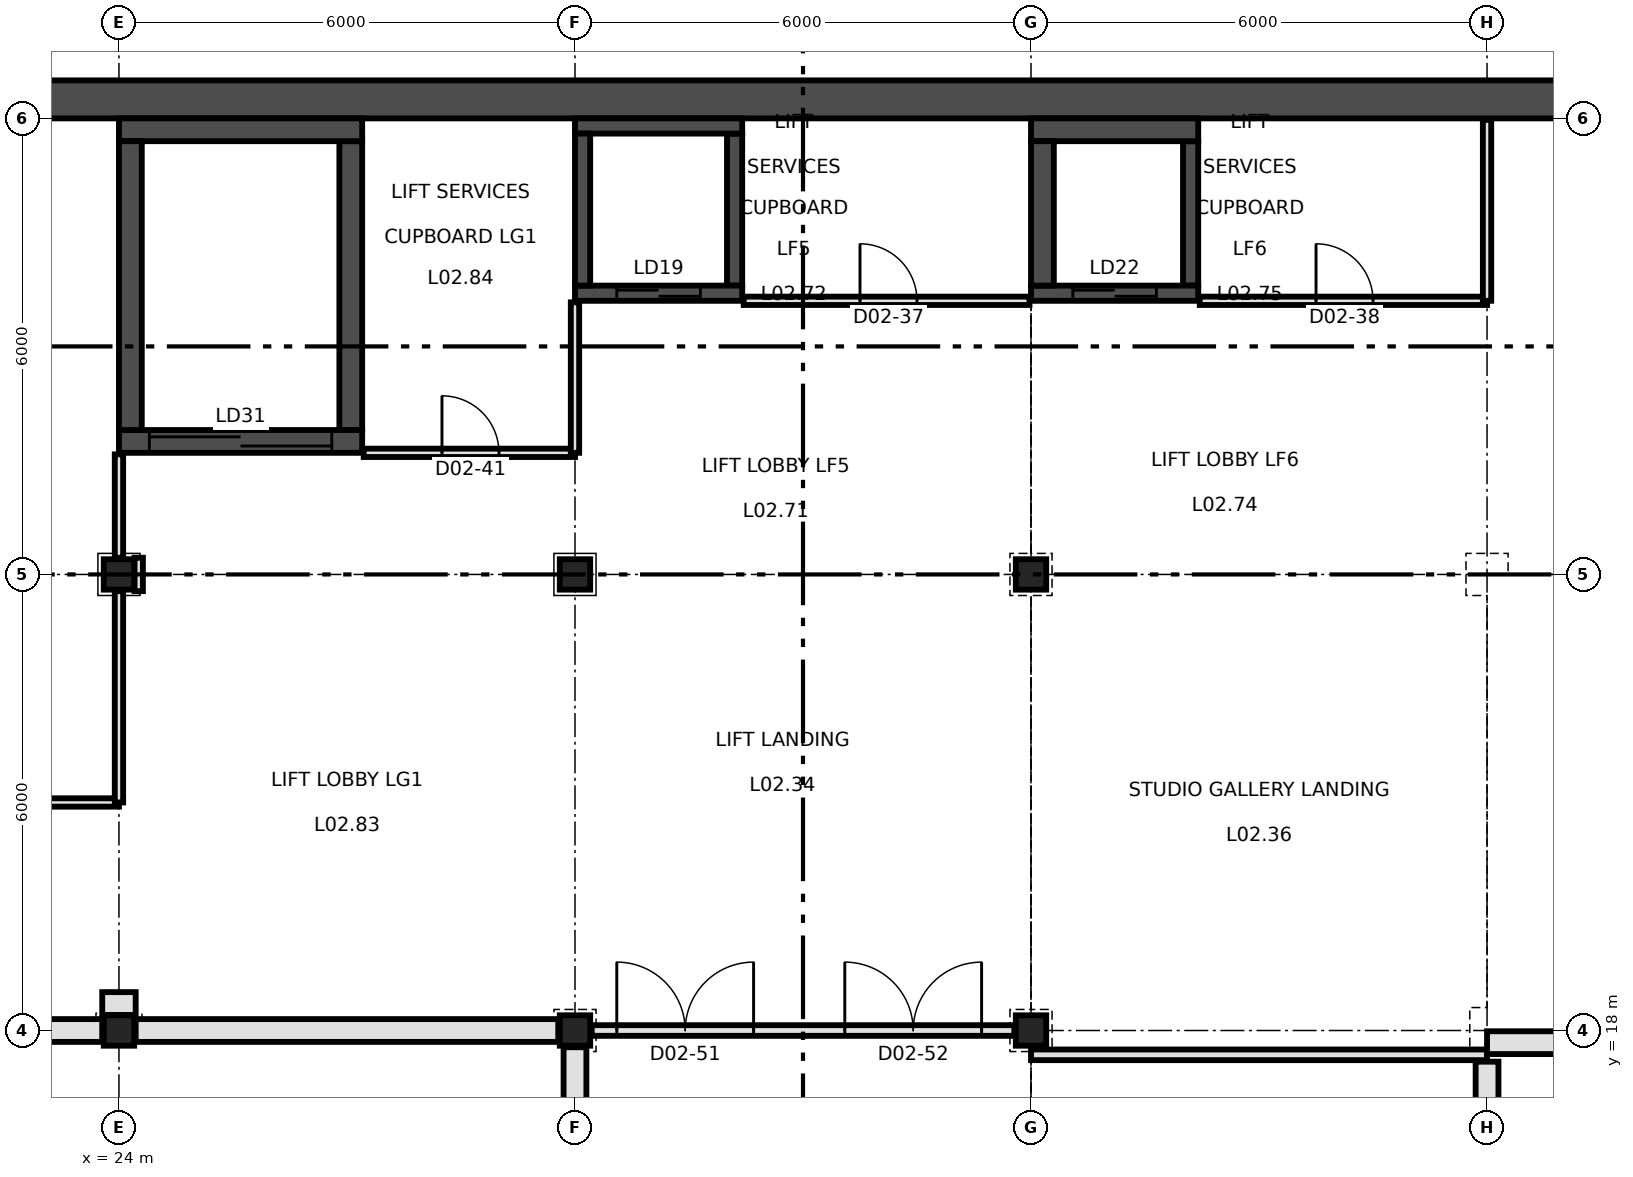
"""IFC4 building model, lengths in metres.
Left out: names, types, materials, properties, quantities, classifications, styles, units other than length and angle.
Written with IfcOpenShell. Run it as: python <this file> out.ifc"""

import sys

from ifc_helpers import new_model, si_unit, direction, frame, frame_2d, origin, origin_2d, place, context, subcontext, project, spatial, rectangle, extrude, element, fill, save


model = new_model("IFC4")
c1 = context("Model", 3, precision=1e-05, world=origin(), true_north=direction((0.0, 1.0)))
c2 = subcontext(c1, "Body", "Model", "MODEL_VIEW")
j1 = project(units=[si_unit("LENGTHUNIT", "METRE"), si_unit("PLANEANGLEUNIT", "RADIAN")], contexts=[c1])
p1 = place(None, origin())
s1 = spatial("IfcSite", under=j1, at=p1, CompositionType="ELEMENT")
p2 = place(p1, origin())
s2 = spatial("IfcBuilding", under=s1, at=p2, CompositionType="ELEMENT")
p3 = place(p2, frame((0.0, 0.0, 12.0)))
s3 = spatial("IfcBuildingStorey", under=s2, at=p3, CompositionType="ELEMENT", Elevation=12.0)
for number, where, z_axis, x_axis in (
    (1, (24.0, 18.0, 0.0), (0.0, 0.0, 1.0), (1.0, 0.0, 0.0)),
    (2, (30.0, 18.0, 0.0), (0.0, 0.0, 1.0), (1.0, 0.0, 0.0)),
    (3, (36.0, 18.0, 0.0), (0.0, 0.0, 1.0), (1.0, 0.0, 0.0)),
    (4, (24.0, 24.0, 0.0), (0.0, 0.0, 1.0), (1.0, 0.0, 0.0)),
    (5, (30.0, 24.0, 0.0), (0.0, 0.0, 1.0), (1.0, 0.0, 0.0)),
    (6, (36.0, 24.0, 0.0), (0.0, 0.0, 1.0), (1.0, 0.0, 0.0)),
):
    element("IfcColumn", number, at=place(p3, frame(where, z_axis=z_axis, x_axis=x_axis)), inside=s3, PredefinedType="COLUMN", context=c2, shape_type="SweptSolid", body=[
        extrude(rectangle(XDim=0.4, YDim=0.4, at=origin_2d()), origin(), (0.0, 0.0, 1.0), 4.5),
    ])
p4 = place(p3, frame((30.0, 29.9, 0.0), z_axis=(0.0, 0.0, 1.0), x_axis=(1.0, 0.0, 0.0)))
e7 = element("IfcWall", 7, at=p4, inside=s3, PredefinedType="SHEAR", context=c2, shape_type="SweptSolid", body=[
    extrude(rectangle(XDim=2.2, YDim=0.2, at=frame_2d((1.1, 0.0))), origin(), (0.0, 0.0, 1.0), 4.5),
])
p5 = place(p3, frame((30.0, 27.7, 0.0), z_axis=(0.0, 0.0, 1.0), x_axis=(1.0, 0.0, 0.0)))
e8 = element("IfcWall", 8, at=p5, inside=s3, PredefinedType="SHEAR", context=c2, shape_type="SweptSolid", body=[
    extrude(rectangle(XDim=2.2, YDim=0.2, at=frame_2d((1.1, 0.0))), origin(), (0.0, 0.0, 1.0), 4.5),
])
p6 = place(p5, frame((0.55, 0.0, 0.0)))
e9 = element("IfcOpeningElement", 9, at=p6, cuts=e8, PredefinedType="OPENING", context=c2, shape_type="SweptSolid", body=[
    extrude(rectangle(XDim=1.1, YDim=2.1, at=frame_2d((0.55, 1.05))), frame((0.0, 0.11, 0.0), z_axis=(0.0, -1.0, 0.0), x_axis=(1.0, 0.0, 0.0)), (0.0, 0.0, 1.0), 0.22),
])
for number, where, z_axis, x_axis in (
    (10, (30.1, 27.8, 0.0), (0.0, 0.0, 1.0), (0.0, 1.0, 0.0)),
    (11, (32.1, 27.8, 0.0), (0.0, 0.0, 1.0), (0.0, 1.0, 0.0)),
):
    element("IfcWall", number, at=place(p3, frame(where, z_axis=z_axis, x_axis=x_axis)), inside=s3, PredefinedType="SHEAR", context=c2, shape_type="SweptSolid", body=[
        extrude(rectangle(XDim=2.0, YDim=0.2, at=frame_2d((1.0, 0.0))), origin(), (0.0, 0.0, 1.0), 4.5),
    ])
p7 = place(p3, frame((36.0, 29.85, 0.0), z_axis=(0.0, 0.0, 1.0), x_axis=(1.0, 0.0, 0.0)))
e12 = element("IfcWall", 12, at=p7, inside=s3, PredefinedType="SHEAR", context=c2, shape_type="SweptSolid", body=[
    extrude(rectangle(XDim=2.2, YDim=0.3, at=frame_2d((1.1, 0.0))), origin(), (0.0, 0.0, 1.0), 4.5),
])
p8 = place(p3, frame((36.0, 27.7, 0.0), z_axis=(0.0, 0.0, 1.0), x_axis=(1.0, 0.0, 0.0)))
e13 = element("IfcWall", 13, at=p8, inside=s3, PredefinedType="SHEAR", context=c2, shape_type="SweptSolid", body=[
    extrude(rectangle(XDim=2.2, YDim=0.2, at=frame_2d((1.1, 0.0))), origin(), (0.0, 0.0, 1.0), 4.5),
])
p9 = place(p8, frame((0.55, 0.0, 0.0)))
e14 = element("IfcOpeningElement", 14, at=p9, cuts=e13, PredefinedType="OPENING", context=c2, shape_type="SweptSolid", body=[
    extrude(rectangle(XDim=1.1, YDim=2.1, at=frame_2d((0.55, 1.05))), frame((0.0, 0.11, 0.0), z_axis=(0.0, -1.0, 0.0), x_axis=(1.0, 0.0, 0.0)), (0.0, 0.0, 1.0), 0.22),
])
p10 = place(p3, frame((36.15, 27.8, 0.0), z_axis=(0.0, 0.0, 1.0), x_axis=(0.0, 1.0, 0.0)))
e15 = element("IfcWall", 15, at=p10, inside=s3, PredefinedType="SHEAR", context=c2, shape_type="SweptSolid", body=[
    extrude(rectangle(XDim=1.9, YDim=0.3, at=frame_2d((0.95, 0.0))), origin(), (0.0, 0.0, 1.0), 4.5),
])
p11 = place(p3, frame((38.1, 27.8, 0.0), z_axis=(0.0, 0.0, 1.0), x_axis=(0.0, 1.0, 0.0)))
e16 = element("IfcWall", 16, at=p11, inside=s3, PredefinedType="SHEAR", context=c2, shape_type="SweptSolid", body=[
    extrude(rectangle(XDim=1.9, YDim=0.2, at=frame_2d((0.95, 0.0))), origin(), (0.0, 0.0, 1.0), 4.5),
])
p12 = place(p3, frame((24.0, 29.85, 0.0), z_axis=(0.0, 0.0, 1.0), x_axis=(1.0, 0.0, 0.0)))
e17 = element("IfcWall", 17, at=p12, inside=s3, PredefinedType="SHEAR", context=c2, shape_type="SweptSolid", body=[
    extrude(rectangle(XDim=3.2, YDim=0.3, at=frame_2d((1.6, 0.0))), origin(), (0.0, 0.0, 1.0), 4.5),
])
p13 = place(p3, frame((24.0, 25.75, 0.0), z_axis=(0.0, 0.0, 1.0), x_axis=(1.0, 0.0, 0.0)))
e18 = element("IfcWall", 18, at=p13, inside=s3, PredefinedType="SHEAR", context=c2, shape_type="SweptSolid", body=[
    extrude(rectangle(XDim=3.2, YDim=0.3, at=frame_2d((1.6, 0.0))), origin(), (0.0, 0.0, 1.0), 4.5),
])
p14 = place(p13, frame((0.4, 0.0, 0.0)))
e19 = element("IfcOpeningElement", 19, at=p14, cuts=e18, PredefinedType="OPENING", context=c2, shape_type="SweptSolid", body=[
    extrude(rectangle(XDim=2.4, YDim=2.4, at=frame_2d((1.2, 1.2))), frame((0.0, 0.16, 0.0), z_axis=(0.0, -1.0, 0.0), x_axis=(1.0, 0.0, 0.0)), (0.0, 0.0, 1.0), 0.32),
])
for number, where, z_axis, x_axis in (
    (20, (24.15, 25.9, 0.0), (0.0, 0.0, 1.0), (0.0, 1.0, 0.0)),
    (21, (27.05, 25.9, 0.0), (0.0, 0.0, 1.0), (0.0, 1.0, 0.0)),
):
    element("IfcWall", number, at=place(p3, frame(where, z_axis=z_axis, x_axis=x_axis)), inside=s3, PredefinedType="SHEAR", context=c2, shape_type="SweptSolid", body=[
        extrude(rectangle(XDim=3.8, YDim=0.3, at=frame_2d((1.9, 0.0))), origin(), (0.0, 0.0, 1.0), 4.5),
    ])
p15 = place(p3, frame((18.5, 30.25, 0.0), z_axis=(0.0, 0.0, 1.0), x_axis=(1.0, 0.0, 0.0)))
e22 = element("IfcWall", 22, at=p15, inside=s3, PredefinedType="SHEAR", context=c2, shape_type="SweptSolid", body=[
    extrude(rectangle(XDim=29.0, YDim=0.5, at=frame_2d((14.5, 0.0))), origin(), (0.0, 0.0, 1.0), 4.5),
])
p16 = place(p3, frame((18.0, 21.0, 0.0), z_axis=(0.0, 0.0, 1.0), x_axis=(1.0, 0.0, 0.0)))
e23 = element("IfcWall", 23, at=p16, inside=s3, PredefinedType="PARTITIONING", context=c2, shape_type="SweptSolid", body=[
    extrude(rectangle(XDim=6.0, YDim=0.11, at=frame_2d((3.0, 0.0))), origin(), (0.0, 0.0, 1.0), 4.28),
])
p17 = place(p16, frame((2.25, 0.0, 0.0)))
e24 = element("IfcOpeningElement", 24, at=p17, cuts=e23, PredefinedType="OPENING", context=c2, shape_type="SweptSolid", body=[
    extrude(rectangle(XDim=1.5, YDim=2.1, at=frame_2d((0.75, 1.05))), frame((0.0, 0.065, 0.0), z_axis=(0.0, -1.0, 0.0), x_axis=(1.0, 0.0, 0.0)), (0.0, 0.0, 1.0), 0.13),
])
p18 = place(p3, frame((24.0, 21.0, 0.0), z_axis=(0.0, 0.0, 1.0), x_axis=(0.0, 1.0, 0.0)))
e25 = element("IfcWall", 25, at=p18, inside=s3, PredefinedType="PARTITIONING", context=c2, shape_type="SweptSolid", body=[
    extrude(rectangle(XDim=2.78, YDim=0.11, at=frame_2d((1.39, 0.0))), origin(), (0.0, 0.0, 1.0), 4.28),
])
p19 = place(p3, frame((24.0, 24.22, 0.0), z_axis=(0.0, 0.0, 1.0), x_axis=(0.0, 1.0, 0.0)))
e26 = element("IfcWall", 26, at=p19, inside=s3, PredefinedType="PARTITIONING", context=c2, shape_type="SweptSolid", body=[
    extrude(rectangle(XDim=1.36, YDim=0.11, at=frame_2d((0.68, 0.0))), origin(), (0.0, 0.0, 1.0), 4.28),
])
p20 = place(p3, frame((24.26, 23.78, 0.0), z_axis=(0.0, 0.0, 1.0), x_axis=(0.0, 1.0, 0.0)))
e27 = element("IfcWall", 27, at=p20, inside=s3, PredefinedType="PARTITIONING", context=c2, shape_type="SweptSolid", body=[
    extrude(rectangle(XDim=0.44, YDim=0.11, at=frame_2d((0.22, 0.0))), origin(), (0.0, 0.0, 1.0), 4.28),
])
p21 = place(p3, frame((27.22, 25.6, 0.0), z_axis=(0.0, 0.0, 1.0), x_axis=(1.0, 0.0, 0.0)))
e28 = element("IfcWall", 28, at=p21, inside=s3, PredefinedType="PARTITIONING", context=c2, shape_type="SweptSolid", body=[
    extrude(rectangle(XDim=2.78, YDim=0.11, at=frame_2d((1.39, 0.0))), origin(), (0.0, 0.0, 1.0), 4.28),
])
p22 = place(p21, frame((1.03, 0.0, 0.0)))
e29 = element("IfcOpeningElement", 29, at=p22, cuts=e28, PredefinedType="OPENING", context=c2, shape_type="SweptSolid", body=[
    extrude(rectangle(XDim=0.75, YDim=2.04, at=frame_2d((0.375, 1.02))), frame((0.0, 0.065, 0.0), z_axis=(0.0, -1.0, 0.0), x_axis=(1.0, 0.0, 0.0)), (0.0, 0.0, 1.0), 0.13),
])
p23 = place(p3, frame((30.0, 25.6, 0.0), z_axis=(0.0, 0.0, 1.0), x_axis=(0.0, 1.0, 0.0)))
e30 = element("IfcWall", 30, at=p23, inside=s3, PredefinedType="PARTITIONING", context=c2, shape_type="SweptSolid", body=[
    extrude(rectangle(XDim=1.98, YDim=0.11, at=frame_2d((0.99, 0.0))), origin(), (0.0, 0.0, 1.0), 4.28),
])
p24 = place(p3, frame((32.22, 27.6, 0.0), z_axis=(0.0, 0.0, 1.0), x_axis=(1.0, 0.0, 0.0)))
e31 = element("IfcWall", 31, at=p24, inside=s3, PredefinedType="PARTITIONING", context=c2, shape_type="SweptSolid", body=[
    extrude(rectangle(XDim=3.76, YDim=0.11, at=frame_2d((1.88, 0.0))), origin(), (0.0, 0.0, 1.0), 4.28),
])
p25 = place(p24, frame((1.53, 0.0, 0.0)))
e32 = element("IfcOpeningElement", 32, at=p25, cuts=e31, PredefinedType="OPENING", context=c2, shape_type="SweptSolid", body=[
    extrude(rectangle(XDim=0.75, YDim=2.04, at=frame_2d((0.375, 1.02))), frame((0.0, 0.065, 0.0), z_axis=(0.0, -1.0, 0.0), x_axis=(1.0, 0.0, 0.0)), (0.0, 0.0, 1.0), 0.13),
])
p26 = place(p3, frame((38.22, 27.6, 0.0), z_axis=(0.0, 0.0, 1.0), x_axis=(1.0, 0.0, 0.0)))
e33 = element("IfcWall", 33, at=p26, inside=s3, PredefinedType="PARTITIONING", context=c2, shape_type="SweptSolid", body=[
    extrude(rectangle(XDim=3.78, YDim=0.11, at=frame_2d((1.89, 0.0))), origin(), (0.0, 0.0, 1.0), 4.28),
])
p27 = place(p26, frame((1.53, 0.0, 0.0)))
e34 = element("IfcOpeningElement", 34, at=p27, cuts=e33, PredefinedType="OPENING", context=c2, shape_type="SweptSolid", body=[
    extrude(rectangle(XDim=0.75, YDim=2.04, at=frame_2d((0.375, 1.02))), frame((0.0, 0.065, 0.0), z_axis=(0.0, -1.0, 0.0), x_axis=(1.0, 0.0, 0.0)), (0.0, 0.0, 1.0), 0.13),
])
p28 = place(p3, frame((42.0, 27.6, 0.0), z_axis=(0.0, 0.0, 1.0), x_axis=(0.0, 1.0, 0.0)))
e35 = element("IfcWall", 35, at=p28, inside=s3, PredefinedType="PARTITIONING", context=c2, shape_type="SweptSolid", body=[
    extrude(rectangle(XDim=2.38, YDim=0.11, at=frame_2d((1.19, 0.0))), origin(), (0.0, 0.0, 1.0), 4.28),
])
p29 = place(p3, frame((30.22, 18.0, 0.0), z_axis=(0.0, 0.0, 1.0), x_axis=(1.0, 0.0, 0.0)))
e36 = element("IfcWall", 36, at=p29, inside=s3, PredefinedType="PARTITIONING", context=c2, shape_type="SweptSolid", body=[
    extrude(rectangle(XDim=5.56, YDim=0.14, at=frame_2d((2.78, 0.0))), origin(), (0.0, 0.0, 1.0), 3.9),
])
p30 = place(p29, frame((0.33, 0.0, 0.0)))
e37 = element("IfcOpeningElement", 37, at=p30, cuts=e36, PredefinedType="OPENING", context=c2, shape_type="SweptSolid", body=[
    extrude(rectangle(XDim=1.8, YDim=2.1, at=frame_2d((0.9, 1.05))), frame((0.0, 0.08, 0.0), z_axis=(0.0, -1.0, 0.0), x_axis=(1.0, 0.0, 0.0)), (0.0, 0.0, 1.0), 0.16),
])
p31 = place(p29, frame((3.33, 0.0, 0.0)))
e38 = element("IfcOpeningElement", 38, at=p31, cuts=e36, PredefinedType="OPENING", context=c2, shape_type="SweptSolid", body=[
    extrude(rectangle(XDim=1.8, YDim=2.1, at=frame_2d((0.9, 1.05))), frame((0.0, 0.08, 0.0), z_axis=(0.0, -1.0, 0.0), x_axis=(1.0, 0.0, 0.0)), (0.0, 0.0, 1.0), 0.16),
])
p32 = place(p3, frame((36.0, 17.68, 0.0), z_axis=(0.0, 0.0, 1.0), x_axis=(1.0, 0.0, 0.0)))
e39 = element("IfcWall", 39, at=p32, inside=s3, PredefinedType="PARTITIONING", context=c2, shape_type="SweptSolid", body=[
    extrude(rectangle(XDim=6.0, YDim=0.14, at=frame_2d((3.0, 0.0))), origin(), (0.0, 0.0, 1.0), 4.28),
])
for number, where, z_axis, x_axis in (
    (40, (24.22, 18.0, 0.0), (0.0, 0.0, 1.0), (1.0, 0.0, 0.0)),
    (41, (18.22, 18.0, 0.0), (0.0, 0.0, 1.0), (1.0, 0.0, 0.0)),
):
    element("IfcWall", number, at=place(p3, frame(where, z_axis=z_axis, x_axis=x_axis)), inside=s3, PredefinedType="PARTITIONING", context=c2, shape_type="SweptSolid", body=[
        extrude(rectangle(XDim=5.56, YDim=0.3, at=frame_2d((2.78, 0.0))), origin(), (0.0, 0.0, 1.0), 3.9),
    ])
p33 = place(p3, frame((23.78, 18.355, 0.0), z_axis=(0.0, 0.0, 1.0), x_axis=(1.0, 0.0, 0.0)))
e42 = element("IfcWall", 42, at=p33, inside=s3, PredefinedType="PARTITIONING", context=c2, shape_type="SweptSolid", body=[
    extrude(rectangle(XDim=0.44, YDim=0.3, at=frame_2d((0.22, 0.0))), origin(), (0.0, 0.0, 1.0), 4.28),
])
p34 = place(p3, frame((42.0, 17.84, 0.0), z_axis=(0.0, 0.0, 1.0), x_axis=(1.0, 0.0, 0.0)))
e43 = element("IfcWall", 43, at=p34, inside=s3, PredefinedType="PARTITIONING", context=c2, shape_type="SweptSolid", body=[
    extrude(rectangle(XDim=12.2, YDim=0.3, at=frame_2d((6.1, 0.0))), origin(), (0.0, 0.0, 1.0), 4.28),
])
p35 = place(p3, frame((30.0, 12.22, 0.0), z_axis=(0.0, 0.0, 1.0), x_axis=(0.0, 1.0, 0.0)))
e44 = element("IfcWall", 44, at=p35, inside=s3, PredefinedType="PARTITIONING", context=c2, shape_type="SweptSolid", body=[
    extrude(rectangle(XDim=5.56, YDim=0.3, at=frame_2d((2.78, 0.0))), origin(), (0.0, 0.0, 1.0), 3.9),
])
p36 = place(p3, frame((42.0, 6.02, 0.0), z_axis=(0.0, 0.0, 1.0), x_axis=(0.0, 1.0, 0.0)))
e45 = element("IfcWall", 45, at=p36, inside=s3, PredefinedType="PARTITIONING", context=c2, shape_type="SweptSolid", body=[
    extrude(rectangle(XDim=11.57, YDim=0.3, at=frame_2d((5.785, 0.0))), origin(), (0.0, 0.0, 1.0), 4.28),
])
p37 = place(p25, origin())
e46 = element("IfcDoor", 46, at=p37, inside=s3, OperationType="SINGLE_SWING_LEFT", PredefinedType="DOOR", context=c2, shape_type="SweptSolid", body=[
    extrude(rectangle(XDim=0.75, YDim=2.04, at=frame_2d((0.375, 1.02))), frame((0.0, 0.025, 0.0), z_axis=(0.0, -1.0, 0.0), x_axis=(1.0, 0.0, 0.0)), (0.0, 0.0, 1.0), 0.05),
])
fill(e32, e46)
p38 = place(p27, origin())
e47 = element("IfcDoor", 47, at=p38, inside=s3, OperationType="SINGLE_SWING_LEFT", PredefinedType="DOOR", context=c2, shape_type="SweptSolid", body=[
    extrude(rectangle(XDim=0.75, YDim=2.04, at=frame_2d((0.375, 1.02))), frame((0.0, 0.025, 0.0), z_axis=(0.0, -1.0, 0.0), x_axis=(1.0, 0.0, 0.0)), (0.0, 0.0, 1.0), 0.05),
])
fill(e34, e47)
p39 = place(p22, origin())
e48 = element("IfcDoor", 48, at=p39, inside=s3, OperationType="SINGLE_SWING_LEFT", PredefinedType="DOOR", context=c2, shape_type="SweptSolid", body=[
    extrude(rectangle(XDim=0.75, YDim=2.04, at=frame_2d((0.375, 1.02))), frame((0.0, 0.025, 0.0), z_axis=(0.0, -1.0, 0.0), x_axis=(1.0, 0.0, 0.0)), (0.0, 0.0, 1.0), 0.05),
])
fill(e29, e48)
p40 = place(p30, origin())
e49 = element("IfcDoor", 49, at=p40, inside=s3, OperationType="DOUBLE_DOOR_SINGLE_SWING", PredefinedType="DOOR", context=c2, shape_type="SweptSolid", body=[
    extrude(rectangle(XDim=1.8, YDim=2.1, at=frame_2d((0.9, 1.05))), frame((0.0, 0.025, 0.0), z_axis=(0.0, -1.0, 0.0), x_axis=(1.0, 0.0, 0.0)), (0.0, 0.0, 1.0), 0.05),
])
fill(e37, e49)
p41 = place(p31, origin())
e50 = element("IfcDoor", 50, at=p41, inside=s3, OperationType="DOUBLE_DOOR_SINGLE_SWING", PredefinedType="DOOR", context=c2, shape_type="SweptSolid", body=[
    extrude(rectangle(XDim=1.8, YDim=2.1, at=frame_2d((0.9, 1.05))), frame((0.0, 0.025, 0.0), z_axis=(0.0, -1.0, 0.0), x_axis=(1.0, 0.0, 0.0)), (0.0, 0.0, 1.0), 0.05),
])
fill(e38, e50)
p42 = place(p6, origin())
e51 = element("IfcDoor", 51, at=p42, inside=s3, OperationType="DOUBLE_DOOR_SLIDING", PredefinedType="DOOR", context=c2, shape_type="SweptSolid", body=[
    extrude(rectangle(XDim=1.1, YDim=2.1, at=frame_2d((0.55, 1.05))), frame((0.0, 0.025, 0.0), z_axis=(0.0, -1.0, 0.0), x_axis=(1.0, 0.0, 0.0)), (0.0, 0.0, 1.0), 0.05),
])
fill(e9, e51)
p43 = place(p9, origin())
e52 = element("IfcDoor", 52, at=p43, inside=s3, OperationType="DOUBLE_DOOR_SLIDING", PredefinedType="DOOR", context=c2, shape_type="SweptSolid", body=[
    extrude(rectangle(XDim=1.1, YDim=2.1, at=frame_2d((0.55, 1.05))), frame((0.0, 0.025, 0.0), z_axis=(0.0, -1.0, 0.0), x_axis=(1.0, 0.0, 0.0)), (0.0, 0.0, 1.0), 0.05),
])
fill(e14, e52)
p44 = place(p14, origin())
e53 = element("IfcDoor", 53, at=p44, inside=s3, OperationType="DOUBLE_DOOR_SLIDING", PredefinedType="DOOR", context=c2, shape_type="SweptSolid", body=[
    extrude(rectangle(XDim=2.4, YDim=2.4, at=frame_2d((1.2, 1.2))), frame((0.0, 0.025, 0.0), z_axis=(0.0, -1.0, 0.0), x_axis=(1.0, 0.0, 0.0)), (0.0, 0.0, 1.0), 0.05),
])
fill(e19, e53)
save(model, sys.argv[1])
